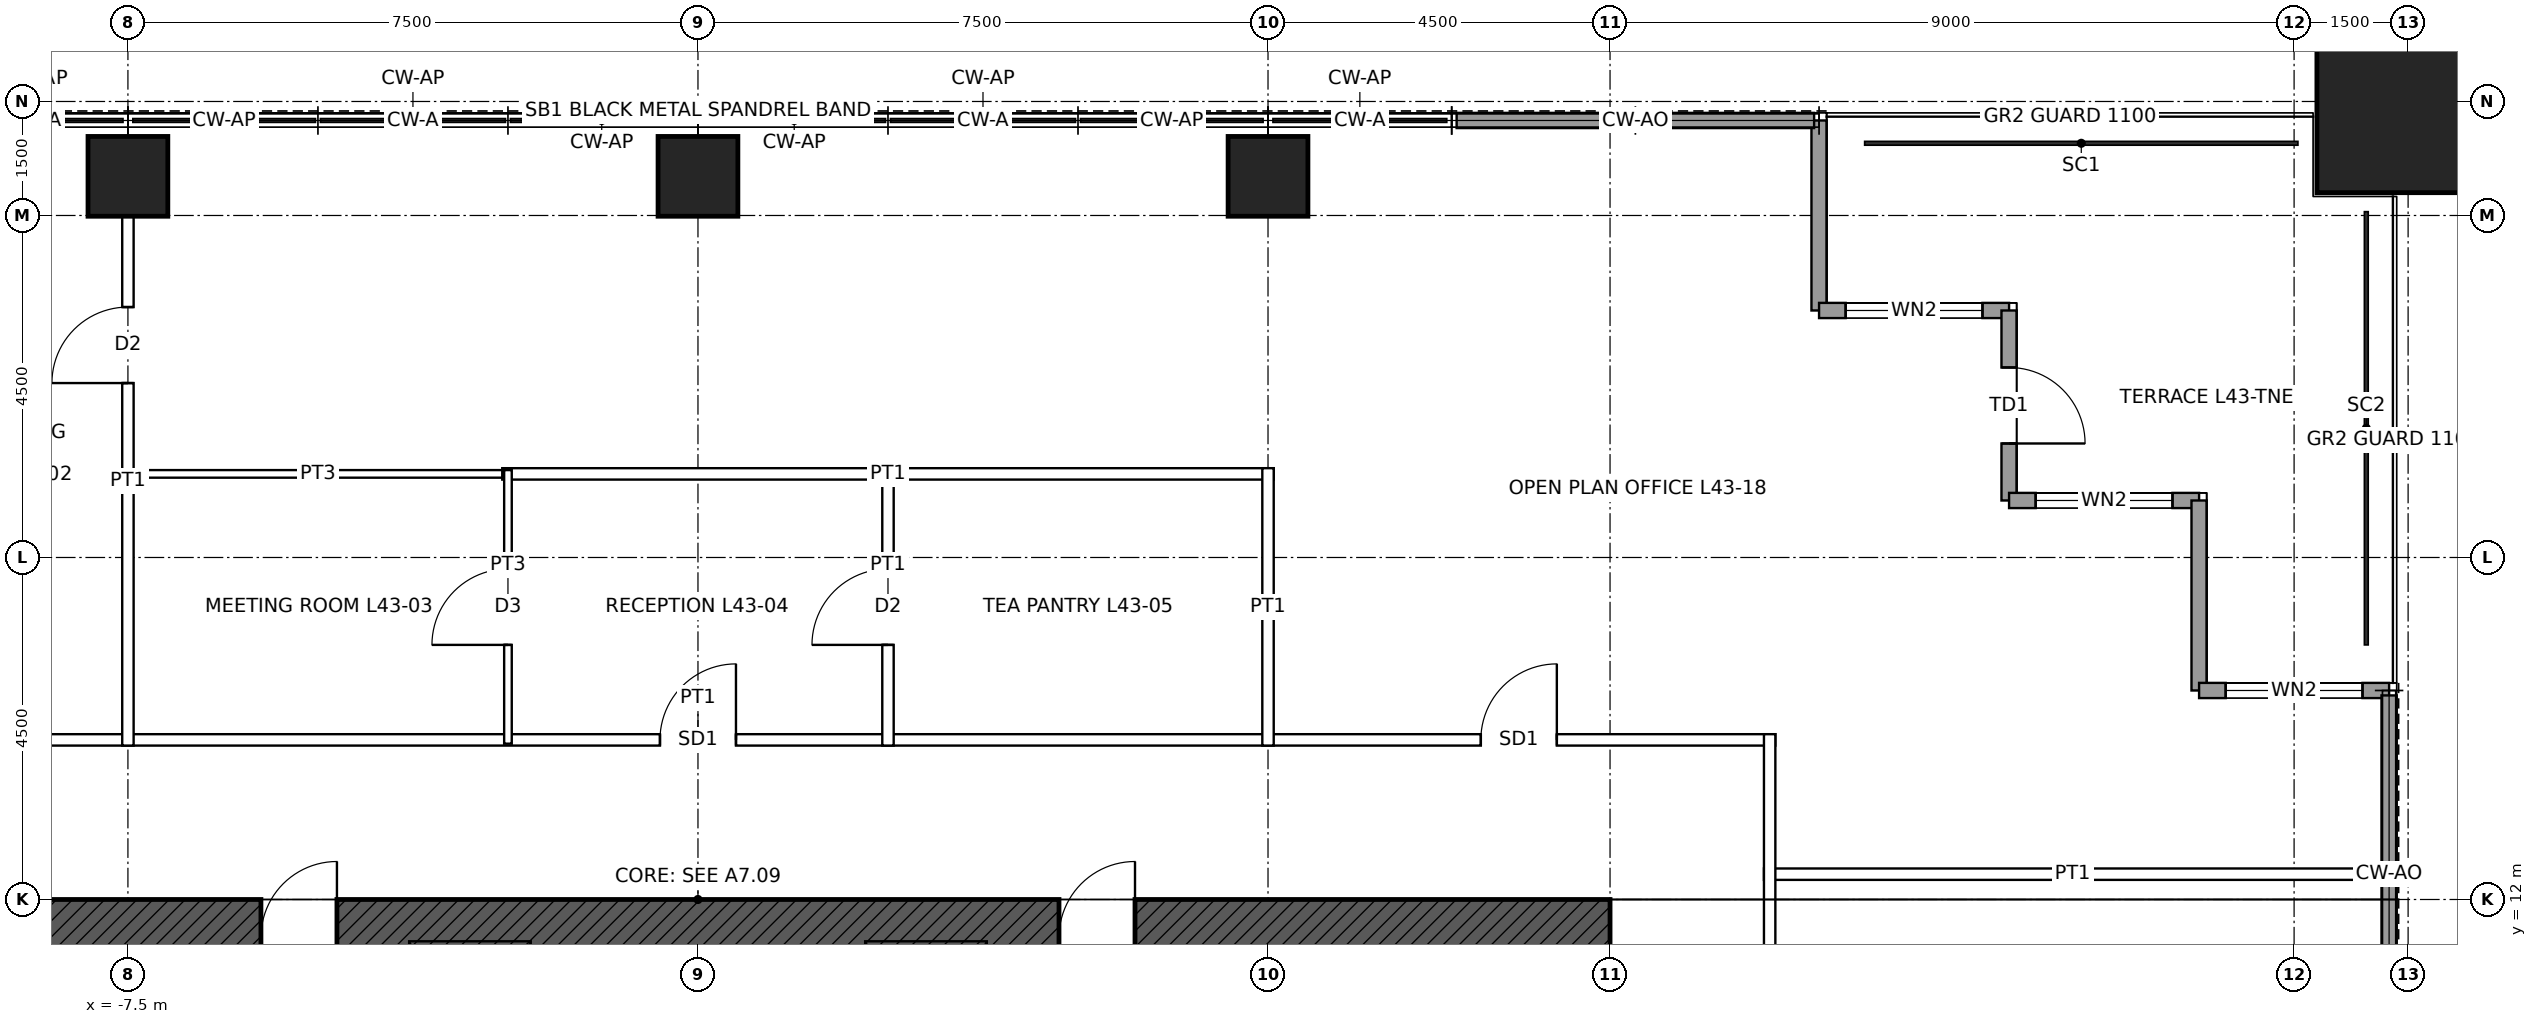
"""IFC4 building model, lengths in metres.
Left out: names, types, materials, properties, quantities, classifications, styles, units other than length and angle.
Written with IfcOpenShell. Run it as: python <this file> out.ifc"""

import sys

from ifc_helpers import new_model, si_unit, direction, frame, frame_2d, origin, origin_2d, place, context, subcontext, project, spatial, rectangle, hollow_rectangle, extrude, element, fill, save


model = new_model("IFC4")
c1 = context("Model", 3, precision=1e-05, world=origin(), true_north=direction((0.0, 1.0)))
c2 = subcontext(c1, "Body", "Model", "MODEL_VIEW")
j1 = project(units=[si_unit("LENGTHUNIT", "METRE"), si_unit("PLANEANGLEUNIT", "RADIAN")], contexts=[c1])
p1 = place(None, origin())
s1 = spatial("IfcSite", under=j1, at=p1, CompositionType="ELEMENT")
p2 = place(p1, origin())
s2 = spatial("IfcBuilding", under=s1, at=p2, CompositionType="ELEMENT")
p3 = place(p2, frame((0.0, 0.0, 205.9)))
s3 = spatial("IfcBuildingStorey", under=s2, at=p3, CompositionType="ELEMENT", Elevation=205.9)
p4 = place(p3, frame((22.5, 22.5, 0.0), z_axis=(0.0, 0.0, 1.0), x_axis=(1.0, 0.0, 0.0)))
e1 = element("IfcColumn", 1, at=p4, inside=s3, PredefinedType="COLUMN", context=c2, shape_type="SweptSolid", body=[
    extrude(hollow_rectangle(XDim=2.4, YDim=2.4, WallThickness=0.12, at=origin_2d()), origin(), (0.0, 0.0, 1.0), 4.0),
])
for number, where, z_axis, x_axis in (
    (2, (-7.5, 21.515, 0.0), (0.0, 0.0, 1.0), (1.0, 0.0, 0.0)),
    (3, (0.0, 21.515, 0.0), (0.0, 0.0, 1.0), (1.0, 0.0, 0.0)),
    (4, (7.5, 21.515, 0.0), (0.0, 0.0, 1.0), (1.0, 0.0, 0.0)),
):
    element("IfcColumn", number, at=place(p3, frame(where, z_axis=z_axis, x_axis=x_axis)), inside=s3, PredefinedType="COLUMN", context=c2, shape_type="SweptSolid", body=[
        extrude(hollow_rectangle(XDim=1.05, YDim=1.05, WallThickness=0.07, at=origin_2d()), origin(), (0.0, 0.0, 1.0), 4.0),
    ])
p5 = place(p3, frame((-12.0, 11.5, 0.0), z_axis=(0.0, 0.0, 1.0), x_axis=(1.0, 0.0, 0.0)))
e5 = element("IfcWall", 5, at=p5, inside=s3, PredefinedType="SHEAR", context=c2, shape_type="SweptSolid", body=[
    extrude(rectangle(XDim=24.0, YDim=1.0, at=frame_2d((12.0, 0.0))), origin(), (0.0, 0.0, 1.0), 4.0),
])
p6 = place(p5, frame((6.25, 0.0, 0.0)))
e6 = element("IfcOpeningElement", 6, at=p6, cuts=e5, PredefinedType="OPENING", context=c2, shape_type="SweptSolid", body=[
    extrude(rectangle(XDim=1.0, YDim=2.4, at=frame_2d((0.5, 1.2))), frame((0.0, 0.51, 0.0), z_axis=(0.0, -1.0, 0.0), x_axis=(1.0, 0.0, 0.0)), (0.0, 0.0, 1.0), 1.02),
])
p7 = place(p5, frame((16.75, 0.0, 0.0)))
e7 = element("IfcOpeningElement", 7, at=p7, cuts=e5, PredefinedType="OPENING", context=c2, shape_type="SweptSolid", body=[
    extrude(rectangle(XDim=1.0, YDim=2.4, at=frame_2d((0.5, 1.2))), frame((0.0, 0.51, 0.0), z_axis=(0.0, -1.0, 0.0), x_axis=(1.0, 0.0, 0.0)), (0.0, 0.0, 1.0), 1.02),
])
p8 = place(p3, frame((14.75, 22.25, 0.0), z_axis=(0.0, 0.0, 1.0), x_axis=(0.0, -1.0, 0.0)))
e8 = element("IfcWall", 8, at=p8, inside=s3, PredefinedType="SOLIDWALL", context=c2, shape_type="SweptSolid", body=[
    extrude(rectangle(XDim=2.5, YDim=0.2, at=frame_2d((1.25, 0.0))), origin(), (0.0, 0.0, 1.0), 3.85),
])
p9 = place(p3, frame((14.75, 19.75, 0.0), z_axis=(0.0, 0.0, 1.0), x_axis=(1.0, 0.0, 0.0)))
e9 = element("IfcWall", 9, at=p9, inside=s3, PredefinedType="SOLIDWALL", context=c2, shape_type="SweptSolid", body=[
    extrude(rectangle(XDim=2.5, YDim=0.2, at=frame_2d((1.25, 0.0))), origin(), (0.0, 0.0, 1.0), 3.85),
])
p10 = place(p9, frame((0.35, 0.0, 0.3)))
e10 = element("IfcOpeningElement", 10, at=p10, cuts=e9, PredefinedType="OPENING", context=c2, shape_type="SweptSolid", body=[
    extrude(rectangle(XDim=1.8, YDim=2.4, at=frame_2d((0.9, 1.2))), frame((0.0, 0.11, 0.0), z_axis=(0.0, -1.0, 0.0), x_axis=(1.0, 0.0, 0.0)), (0.0, 0.0, 1.0), 0.22),
])
p11 = place(p3, frame((17.25, 19.75, 0.0), z_axis=(0.0, 0.0, 1.0), x_axis=(0.0, -1.0, 0.0)))
e11 = element("IfcWall", 11, at=p11, inside=s3, PredefinedType="SOLIDWALL", context=c2, shape_type="SweptSolid", body=[
    extrude(rectangle(XDim=2.5, YDim=0.2, at=frame_2d((1.25, 0.0))), origin(), (0.0, 0.0, 1.0), 3.85),
])
p12 = place(p11, frame((0.75, 0.0, 0.0)))
e12 = element("IfcOpeningElement", 12, at=p12, cuts=e11, PredefinedType="OPENING", context=c2, shape_type="SweptSolid", body=[
    extrude(rectangle(XDim=1.0, YDim=2.4, at=frame_2d((0.5, 1.2))), frame((0.0, 0.11, 0.0), z_axis=(0.0, -1.0, 0.0), x_axis=(1.0, 0.0, 0.0)), (0.0, 0.0, 1.0), 0.22),
])
p13 = place(p3, frame((17.25, 17.25, 0.0), z_axis=(0.0, 0.0, 1.0), x_axis=(1.0, 0.0, 0.0)))
e13 = element("IfcWall", 13, at=p13, inside=s3, PredefinedType="SOLIDWALL", context=c2, shape_type="SweptSolid", body=[
    extrude(rectangle(XDim=2.5, YDim=0.2, at=frame_2d((1.25, 0.0))), origin(), (0.0, 0.0, 1.0), 3.85),
])
p14 = place(p13, frame((0.35, 0.0, 0.3)))
e14 = element("IfcOpeningElement", 14, at=p14, cuts=e13, PredefinedType="OPENING", context=c2, shape_type="SweptSolid", body=[
    extrude(rectangle(XDim=1.8, YDim=2.4, at=frame_2d((0.9, 1.2))), frame((0.0, 0.11, 0.0), z_axis=(0.0, -1.0, 0.0), x_axis=(1.0, 0.0, 0.0)), (0.0, 0.0, 1.0), 0.22),
])
p15 = place(p3, frame((19.75, 17.25, 0.0), z_axis=(0.0, 0.0, 1.0), x_axis=(0.0, -1.0, 0.0)))
e15 = element("IfcWall", 15, at=p15, inside=s3, PredefinedType="SOLIDWALL", context=c2, shape_type="SweptSolid", body=[
    extrude(rectangle(XDim=2.5, YDim=0.2, at=frame_2d((1.25, 0.0))), origin(), (0.0, 0.0, 1.0), 3.85),
])
p16 = place(p3, frame((19.75, 14.75, 0.0), z_axis=(0.0, 0.0, 1.0), x_axis=(1.0, 0.0, 0.0)))
e16 = element("IfcWall", 16, at=p16, inside=s3, PredefinedType="SOLIDWALL", context=c2, shape_type="SweptSolid", body=[
    extrude(rectangle(XDim=2.5, YDim=0.2, at=frame_2d((1.25, 0.0))), origin(), (0.0, 0.0, 1.0), 3.85),
])
p17 = place(p16, frame((0.35, 0.0, 0.3)))
e17 = element("IfcOpeningElement", 17, at=p17, cuts=e16, PredefinedType="OPENING", context=c2, shape_type="SweptSolid", body=[
    extrude(rectangle(XDim=1.8, YDim=2.4, at=frame_2d((0.9, 1.2))), frame((0.0, 0.11, 0.0), z_axis=(0.0, -1.0, 0.0), x_axis=(1.0, 0.0, 0.0)), (0.0, 0.0, 1.0), 0.22),
])
for number, where, z_axis, x_axis in (
    (18, (9.982, 22.25, 0.0), (0.0, 0.0, 1.0), (1.0, 0.0, 0.0)),
    (19, (12.366, 22.25, 0.0), (0.0, 0.0, 1.0), (1.0, 0.0, 0.0)),
    (20, (22.25, 14.685, 0.0), (0.0, 0.0, 1.0), (0.0, -1.0, 0.0)),
    (21, (22.25, 12.301, 0.0), (0.0, 0.0, 1.0), (0.0, -1.0, 0.0)),
):
    element("IfcWall", number, at=place(p3, frame(where, z_axis=z_axis, x_axis=x_axis)), inside=s3, PredefinedType="SOLIDWALL", context=c2, shape_type="SweptSolid", body=[
        extrude(rectangle(XDim=2.319, YDim=0.2, at=frame_2d((1.16, 0.0))), origin(), (0.0, 0.0, 1.0), 3.85),
    ])
p18 = place(p3, frame((14.025, 12.333, 0.0), z_axis=(0.0, 0.0, 1.0), x_axis=(1.0, 0.0, 0.0)))
e22 = element("IfcWall", 22, at=p18, inside=s3, PredefinedType="PARTITIONING", context=c2, shape_type="SweptSolid", body=[
    extrude(rectangle(XDim=8.125, YDim=0.15, at=frame_2d((4.062, 0.0))), origin(), (0.0, 0.0, 1.0), 3.85),
])
p19 = place(p3, frame((-14.175, 14.1, 0.0), z_axis=(0.0, 0.0, 1.0), x_axis=(1.0, 0.0, 0.0)))
e23 = element("IfcWall", 23, at=p19, inside=s3, PredefinedType="PARTITIONING", context=c2, shape_type="SweptSolid", body=[
    extrude(rectangle(XDim=28.35, YDim=0.15, at=frame_2d((14.175, 0.0))), origin(), (0.0, 0.0, 1.0), 3.85),
])
p20 = place(p19, frame((13.675, 0.0, 0.0)))
e24 = element("IfcOpeningElement", 24, at=p20, cuts=e23, PredefinedType="OPENING", context=c2, shape_type="SweptSolid", body=[
    extrude(rectangle(XDim=1.0, YDim=2.4, at=frame_2d((0.5, 1.2))), frame((0.0, 0.085, 0.0), z_axis=(0.0, -1.0, 0.0), x_axis=(1.0, 0.0, 0.0)), (0.0, 0.0, 1.0), 0.17),
])
p21 = place(p19, frame((24.475, 0.0, 0.0)))
e25 = element("IfcOpeningElement", 25, at=p21, cuts=e23, PredefinedType="OPENING", context=c2, shape_type="SweptSolid", body=[
    extrude(rectangle(XDim=1.0, YDim=2.4, at=frame_2d((0.5, 1.2))), frame((0.0, 0.085, 0.0), z_axis=(0.0, -1.0, 0.0), x_axis=(1.0, 0.0, 0.0)), (0.0, 0.0, 1.0), 0.17),
])
p22 = place(p3, frame((-7.55, 17.6, 0.0), z_axis=(0.0, 0.0, 1.0), x_axis=(1.0, 0.0, 0.0)))
e26 = element("IfcWall", 26, at=p22, inside=s3, PredefinedType="PARTITIONING", context=c2, shape_type="SweptSolid", body=[
    extrude(rectangle(XDim=5.1, YDim=0.1, at=frame_2d((2.55, 0.0))), origin(), (0.0, 0.0, 1.0), 3.85),
])
p23 = place(p3, frame((-2.575, 17.6, 0.0), z_axis=(0.0, 0.0, 1.0), x_axis=(1.0, 0.0, 0.0)))
e27 = element("IfcWall", 27, at=p23, inside=s3, PredefinedType="PARTITIONING", context=c2, shape_type="SweptSolid", body=[
    extrude(rectangle(XDim=10.15, YDim=0.15, at=frame_2d((5.075, 0.0))), origin(), (0.0, 0.0, 1.0), 3.85),
])
p24 = place(p3, frame((-7.5, 14.025, 0.0), z_axis=(0.0, 0.0, 1.0), x_axis=(0.0, 1.0, 0.0)))
e28 = element("IfcWall", 28, at=p24, inside=s3, PredefinedType="PARTITIONING", context=c2, shape_type="SweptSolid", body=[
    extrude(rectangle(XDim=6.965, YDim=0.15, at=frame_2d((3.482, 0.0))), origin(), (0.0, 0.0, 1.0), 3.238),
])
p25 = place(p24, frame((4.77, 0.0, 0.0)))
e29 = element("IfcOpeningElement", 29, at=p25, cuts=e28, PredefinedType="OPENING", context=c2, shape_type="SweptSolid", body=[
    extrude(rectangle(XDim=1.0, YDim=2.1, at=frame_2d((0.5, 1.05))), frame((0.0, 0.085, 0.0), z_axis=(0.0, -1.0, 0.0), x_axis=(1.0, 0.0, 0.0)), (0.0, 0.0, 1.0), 0.17),
])
p26 = place(p3, frame((-2.5, 14.05, 0.0), z_axis=(0.0, 0.0, 1.0), x_axis=(0.0, 1.0, 0.0)))
e30 = element("IfcWall", 30, at=p26, inside=s3, PredefinedType="PARTITIONING", context=c2, shape_type="SweptSolid", body=[
    extrude(rectangle(XDim=3.6, YDim=0.1, at=frame_2d((1.8, 0.0))), origin(), (0.0, 0.0, 1.0), 3.85),
])
p27 = place(p26, frame((1.3, 0.0, 0.0)))
e31 = element("IfcOpeningElement", 31, at=p27, cuts=e30, PredefinedType="OPENING", context=c2, shape_type="SweptSolid", body=[
    extrude(rectangle(XDim=1.0, YDim=2.1, at=frame_2d((0.5, 1.05))), frame((0.0, 0.06, 0.0), z_axis=(0.0, -1.0, 0.0), x_axis=(1.0, 0.0, 0.0)), (0.0, 0.0, 1.0), 0.12),
])
p28 = place(p3, frame((2.5, 14.025, 0.0), z_axis=(0.0, 0.0, 1.0), x_axis=(0.0, 1.0, 0.0)))
e32 = element("IfcWall", 32, at=p28, inside=s3, PredefinedType="PARTITIONING", context=c2, shape_type="SweptSolid", body=[
    extrude(rectangle(XDim=3.65, YDim=0.15, at=frame_2d((1.825, 0.0))), origin(), (0.0, 0.0, 1.0), 3.85),
])
p29 = place(p28, frame((1.325, 0.0, 0.0)))
e33 = element("IfcOpeningElement", 33, at=p29, cuts=e32, PredefinedType="OPENING", context=c2, shape_type="SweptSolid", body=[
    extrude(rectangle(XDim=1.0, YDim=2.1, at=frame_2d((0.5, 1.05))), frame((0.0, 0.085, 0.0), z_axis=(0.0, -1.0, 0.0), x_axis=(1.0, 0.0, 0.0)), (0.0, 0.0, 1.0), 0.17),
])
p30 = place(p3, frame((7.5, 14.025, 0.0), z_axis=(0.0, 0.0, 1.0), x_axis=(0.0, 1.0, 0.0)))
e34 = element("IfcWall", 34, at=p30, inside=s3, PredefinedType="PARTITIONING", context=c2, shape_type="SweptSolid", body=[
    extrude(rectangle(XDim=3.65, YDim=0.15, at=frame_2d((1.825, 0.0))), origin(), (0.0, 0.0, 1.0), 3.238),
])
p31 = place(p3, frame((14.1, 7.425, 0.0), z_axis=(0.0, 0.0, 1.0), x_axis=(0.0, 1.0, 0.0)))
e35 = element("IfcWall", 35, at=p31, inside=s3, PredefinedType="PARTITIONING", context=c2, shape_type="SweptSolid", body=[
    extrude(rectangle(XDim=6.75, YDim=0.15, at=frame_2d((3.375, 0.0))), origin(), (0.0, 0.0, 1.0), 3.85),
])
p32 = place(p10, origin())
e36 = element("IfcWindow", 36, at=p32, inside=s3, PartitioningType="SINGLE_PANEL", PredefinedType="WINDOW", context=c2, shape_type="SweptSolid", body=[
    extrude(rectangle(XDim=1.8, YDim=2.4, at=frame_2d((0.9, 1.2))), frame((0.0, 0.03, 0.0), z_axis=(0.0, -1.0, 0.0), x_axis=(1.0, 0.0, 0.0)), (0.0, 0.0, 1.0), 0.06),
])
fill(e10, e36)
p33 = place(p12, origin())
e37 = element("IfcDoor", 37, at=p33, inside=s3, OperationType="SINGLE_SWING_RIGHT", PredefinedType="DOOR", context=c2, shape_type="SweptSolid", body=[
    extrude(rectangle(XDim=1.0, YDim=2.4, at=frame_2d((0.5, 1.2))), frame((0.0, 0.025, 0.0), z_axis=(0.0, -1.0, 0.0), x_axis=(1.0, 0.0, 0.0)), (0.0, 0.0, 1.0), 0.05),
])
fill(e12, e37)
p34 = place(p14, origin())
e38 = element("IfcWindow", 38, at=p34, inside=s3, PartitioningType="SINGLE_PANEL", PredefinedType="WINDOW", context=c2, shape_type="SweptSolid", body=[
    extrude(rectangle(XDim=1.8, YDim=2.4, at=frame_2d((0.9, 1.2))), frame((0.0, 0.03, 0.0), z_axis=(0.0, -1.0, 0.0), x_axis=(1.0, 0.0, 0.0)), (0.0, 0.0, 1.0), 0.06),
])
fill(e14, e38)
p35 = place(p17, origin())
e39 = element("IfcWindow", 39, at=p35, inside=s3, PartitioningType="SINGLE_PANEL", PredefinedType="WINDOW", context=c2, shape_type="SweptSolid", body=[
    extrude(rectangle(XDim=1.8, YDim=2.4, at=frame_2d((0.9, 1.2))), frame((0.0, 0.03, 0.0), z_axis=(0.0, -1.0, 0.0), x_axis=(1.0, 0.0, 0.0)), (0.0, 0.0, 1.0), 0.06),
])
fill(e17, e39)
p36 = place(p6, origin())
e40 = element("IfcDoor", 40, at=p36, inside=s3, OperationType="SINGLE_SWING_RIGHT", PredefinedType="DOOR", context=c2, shape_type="SweptSolid", body=[
    extrude(rectangle(XDim=1.0, YDim=2.4, at=frame_2d((0.5, 1.2))), frame((0.0, 0.485, 0.0), z_axis=(0.0, -1.0, 0.0), x_axis=(1.0, 0.0, 0.0)), (0.0, 0.0, 1.0), 0.05),
])
fill(e6, e40)
p37 = place(p7, origin())
e41 = element("IfcDoor", 41, at=p37, inside=s3, OperationType="SINGLE_SWING_RIGHT", PredefinedType="DOOR", context=c2, shape_type="SweptSolid", body=[
    extrude(rectangle(XDim=1.0, YDim=2.4, at=frame_2d((0.5, 1.2))), frame((0.0, 0.485, 0.0), z_axis=(0.0, -1.0, 0.0), x_axis=(1.0, 0.0, 0.0)), (0.0, 0.0, 1.0), 0.05),
])
fill(e7, e41)
p38 = place(p25, origin())
e42 = element("IfcDoor", 42, at=p38, inside=s3, OperationType="SINGLE_SWING_LEFT", PredefinedType="DOOR", context=c2, shape_type="SweptSolid", body=[
    extrude(rectangle(XDim=1.0, YDim=2.1, at=frame_2d((0.5, 1.05))), frame((0.0, 0.025, 0.0), z_axis=(0.0, -1.0, 0.0), x_axis=(1.0, 0.0, 0.0)), (0.0, 0.0, 1.0), 0.05),
])
fill(e29, e42)
p39 = place(p27, origin())
e43 = element("IfcDoor", 43, at=p39, inside=s3, OperationType="SINGLE_SWING_LEFT", PredefinedType="DOOR", context=c2, shape_type="SweptSolid", body=[
    extrude(rectangle(XDim=1.0, YDim=2.1, at=frame_2d((0.5, 1.05))), frame((0.0, 0.025, 0.0), z_axis=(0.0, -1.0, 0.0), x_axis=(1.0, 0.0, 0.0)), (0.0, 0.0, 1.0), 0.05),
])
fill(e31, e43)
p40 = place(p20, origin())
e44 = element("IfcDoor", 44, at=p40, inside=s3, OperationType="SINGLE_SWING_RIGHT", PredefinedType="DOOR", context=c2, shape_type="SweptSolid", body=[
    extrude(rectangle(XDim=1.0, YDim=2.4, at=frame_2d((0.5, 1.2))), frame((0.0, 0.025, 0.0), z_axis=(0.0, -1.0, 0.0), x_axis=(1.0, 0.0, 0.0)), (0.0, 0.0, 1.0), 0.05),
])
fill(e24, e44)
p41 = place(p29, origin())
e45 = element("IfcDoor", 45, at=p41, inside=s3, OperationType="SINGLE_SWING_LEFT", PredefinedType="DOOR", context=c2, shape_type="SweptSolid", body=[
    extrude(rectangle(XDim=1.0, YDim=2.1, at=frame_2d((0.5, 1.05))), frame((0.0, 0.025, 0.0), z_axis=(0.0, -1.0, 0.0), x_axis=(1.0, 0.0, 0.0)), (0.0, 0.0, 1.0), 0.05),
])
fill(e33, e45)
p42 = place(p21, origin())
e46 = element("IfcDoor", 46, at=p42, inside=s3, OperationType="SINGLE_SWING_RIGHT", PredefinedType="DOOR", context=c2, shape_type="SweptSolid", body=[
    extrude(rectangle(XDim=1.0, YDim=2.4, at=frame_2d((0.5, 1.2))), frame((0.0, 0.025, 0.0), z_axis=(0.0, -1.0, 0.0), x_axis=(1.0, 0.0, 0.0)), (0.0, 0.0, 1.0), 0.05),
])
fill(e25, e46)
save(model, sys.argv[1])
